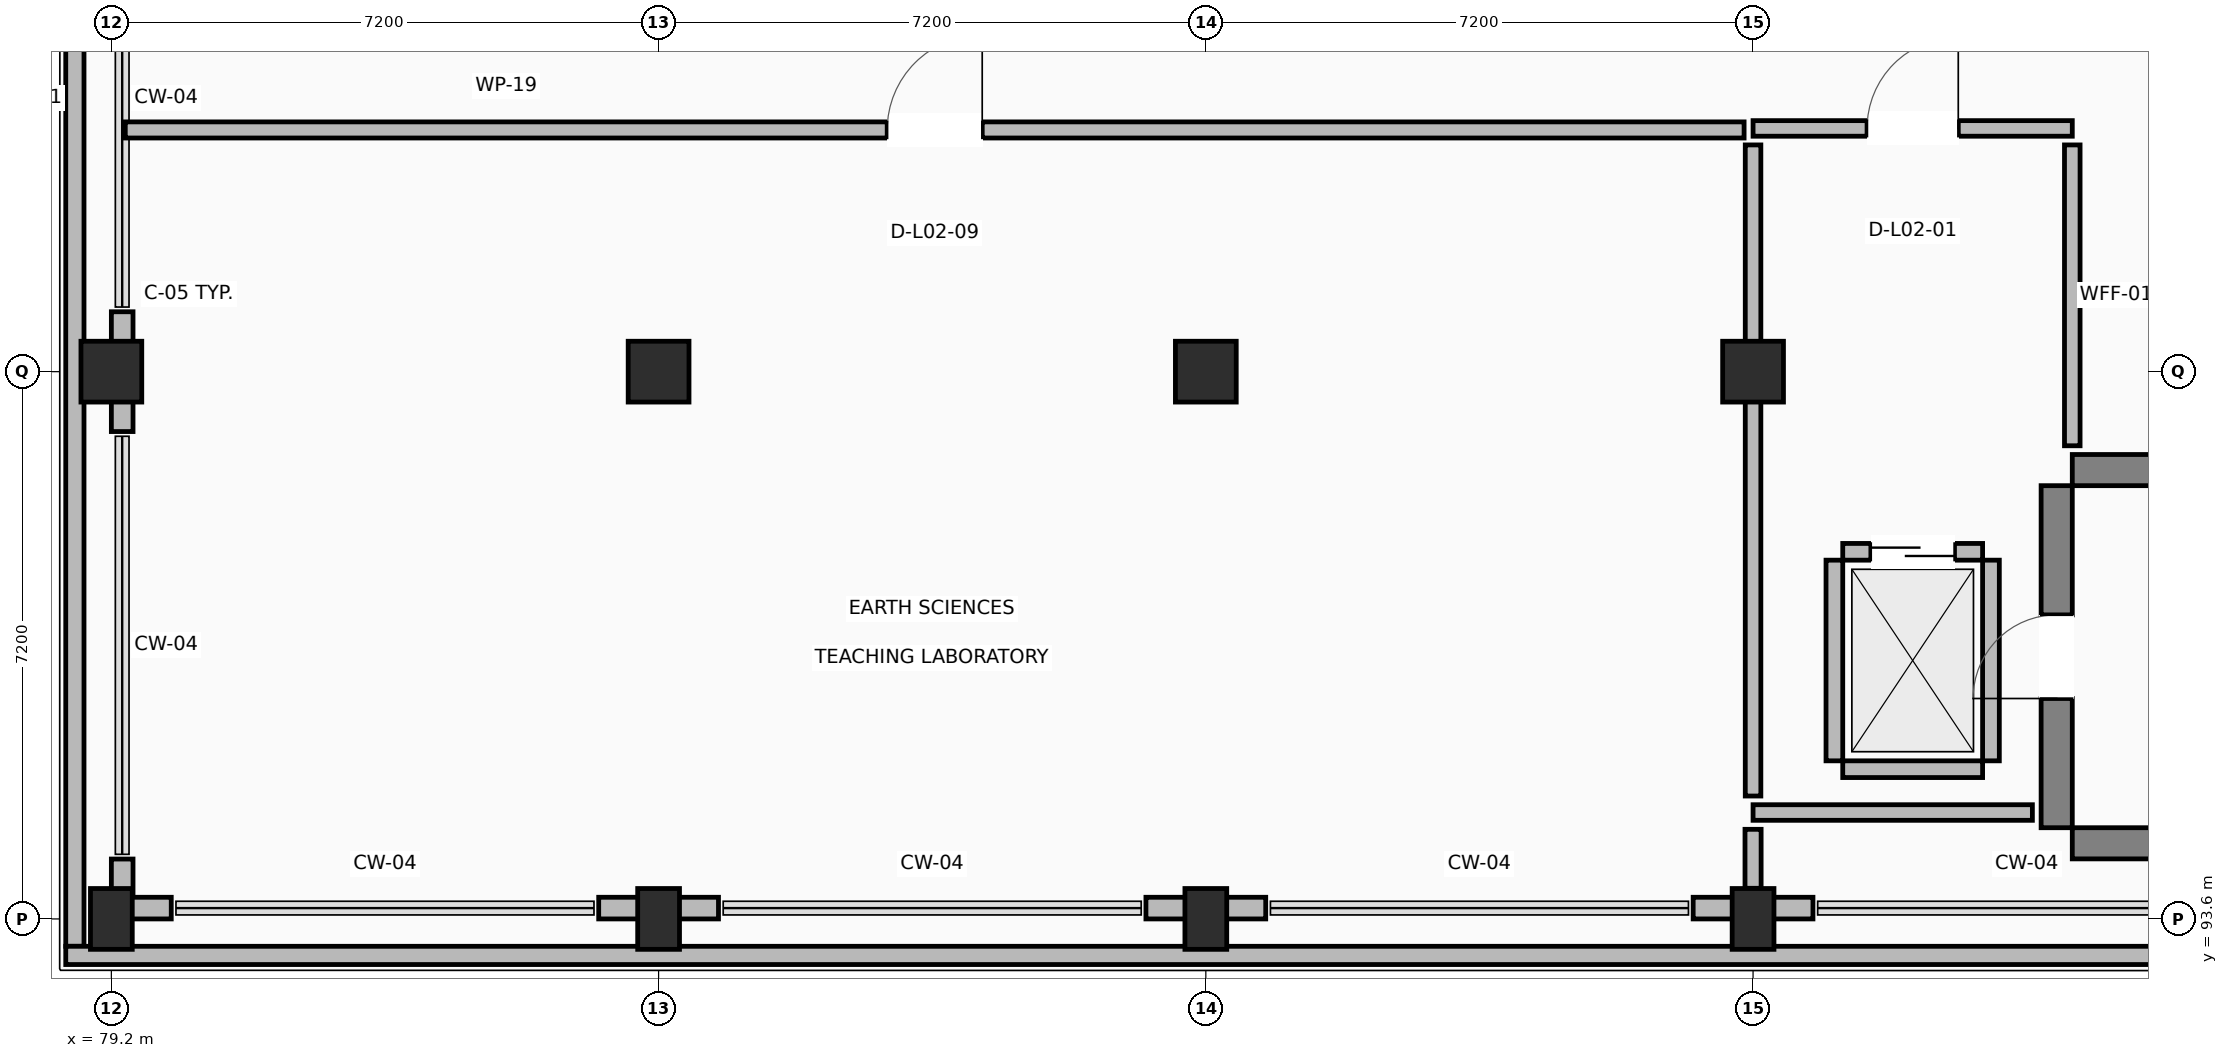
"""IFC4 building model, lengths in metres.
Left out: names, types, materials, properties, quantities, classifications, styles, units other than length and angle.
Written with IfcOpenShell. Run it as: python <this file> out.ifc"""

import sys

from ifc_helpers import new_model, si_unit, direction, frame, frame_2d, origin, origin_2d, place, context, subcontext, project, spatial, rectangle, extrude, element, fill, save


model = new_model("IFC4")
c1 = context("Model", 3, precision=1e-05, world=origin(), true_north=direction((0.0, 1.0)))
c2 = subcontext(c1, "Body", "Model", "MODEL_VIEW")
j1 = project(units=[si_unit("LENGTHUNIT", "METRE"), si_unit("PLANEANGLEUNIT", "RADIAN")], contexts=[c1])
p1 = place(None, origin())
s1 = spatial("IfcSite", under=j1, at=p1, CompositionType="ELEMENT")
p2 = place(p1, origin())
s2 = spatial("IfcBuilding", under=s1, at=p2, CompositionType="ELEMENT")
p3 = place(p2, frame((0.0, 0.0, 9.0)))
s3 = spatial("IfcBuildingStorey", under=s2, at=p3, CompositionType="ELEMENT", Elevation=9.0)
p4 = place(p3, frame((79.2, 93.6, 0.0), z_axis=(0.0, 0.0, 1.0), x_axis=(1.0, 0.0, 0.0)))
e1 = element("IfcColumn", 1, at=p4, inside=s3, PredefinedType="COLUMN", context=c2, shape_type="SweptSolid", body=[
    extrude(rectangle(XDim=0.55, YDim=0.8, at=origin_2d()), origin(), (0.0, 0.0, 1.0), 4.22),
])
p5 = place(p3, frame((79.2, 100.8, 0.0), z_axis=(0.0, 0.0, 1.0), x_axis=(1.0, 0.0, 0.0)))
e2 = element("IfcColumn", 2, at=p5, inside=s3, PredefinedType="COLUMN", context=c2, shape_type="SweptSolid", body=[
    extrude(rectangle(XDim=0.8, YDim=0.8, at=origin_2d()), origin(), (0.0, 0.0, 1.0), 4.22),
])
p6 = place(p3, frame((86.4, 93.6, 0.0), z_axis=(0.0, 0.0, 1.0), x_axis=(1.0, 0.0, 0.0)))
e3 = element("IfcColumn", 3, at=p6, inside=s3, PredefinedType="COLUMN", context=c2, shape_type="SweptSolid", body=[
    extrude(rectangle(XDim=0.55, YDim=0.8, at=origin_2d()), origin(), (0.0, 0.0, 1.0), 4.22),
])
p7 = place(p3, frame((86.4, 100.8, 0.0), z_axis=(0.0, 0.0, 1.0), x_axis=(1.0, 0.0, 0.0)))
e4 = element("IfcColumn", 4, at=p7, inside=s3, PredefinedType="COLUMN", context=c2, shape_type="SweptSolid", body=[
    extrude(rectangle(XDim=0.8, YDim=0.8, at=origin_2d()), origin(), (0.0, 0.0, 1.0), 4.22),
])
p8 = place(p3, frame((93.6, 93.6, 0.0), z_axis=(0.0, 0.0, 1.0), x_axis=(1.0, 0.0, 0.0)))
e5 = element("IfcColumn", 5, at=p8, inside=s3, PredefinedType="COLUMN", context=c2, shape_type="SweptSolid", body=[
    extrude(rectangle(XDim=0.55, YDim=0.8, at=origin_2d()), origin(), (0.0, 0.0, 1.0), 4.22),
])
p9 = place(p3, frame((93.6, 100.8, 0.0), z_axis=(0.0, 0.0, 1.0), x_axis=(1.0, 0.0, 0.0)))
e6 = element("IfcColumn", 6, at=p9, inside=s3, PredefinedType="COLUMN", context=c2, shape_type="SweptSolid", body=[
    extrude(rectangle(XDim=0.8, YDim=0.8, at=origin_2d()), origin(), (0.0, 0.0, 1.0), 4.22),
])
p10 = place(p3, frame((100.8, 93.6, 0.0), z_axis=(0.0, 0.0, 1.0), x_axis=(1.0, 0.0, 0.0)))
e7 = element("IfcColumn", 7, at=p10, inside=s3, PredefinedType="COLUMN", context=c2, shape_type="SweptSolid", body=[
    extrude(rectangle(XDim=0.55, YDim=0.8, at=origin_2d()), origin(), (0.0, 0.0, 1.0), 4.22),
])
p11 = place(p3, frame((100.8, 100.8, 0.0), z_axis=(0.0, 0.0, 1.0), x_axis=(1.0, 0.0, 0.0)))
e8 = element("IfcColumn", 8, at=p11, inside=s3, PredefinedType="COLUMN", context=c2, shape_type="SweptSolid", body=[
    extrude(rectangle(XDim=0.8, YDim=0.8, at=origin_2d()), origin(), (0.0, 0.0, 1.0), 4.22),
])
for number, where, z_axis, x_axis in (
    (9, (105.0, 94.595, 0.0), (0.0, 0.0, 1.0), (1.0, 0.0, 0.0)),
    (10, (105.0, 99.505, 0.0), (0.0, 0.0, 1.0), (1.0, 0.0, 0.0)),
):
    element("IfcWall", number, at=place(p3, frame(where, z_axis=z_axis, x_axis=x_axis)), inside=s3, PredefinedType="SHEAR", context=c2, shape_type="SweptSolid", body=[
        extrude(rectangle(XDim=9.5, YDim=0.41, at=frame_2d((4.75, 0.0))), origin(), (0.0, 0.0, 1.0), 4.22),
    ])
p12 = place(p3, frame((104.795, 94.8, 0.0), z_axis=(0.0, 0.0, 1.0), x_axis=(0.0, 1.0, 0.0)))
e11 = element("IfcWall", 11, at=p12, inside=s3, PredefinedType="SHEAR", context=c2, shape_type="SweptSolid", body=[
    extrude(rectangle(XDim=4.5, YDim=0.41, at=frame_2d((2.25, 0.0))), origin(), (0.0, 0.0, 1.0), 4.22),
])
p13 = place(p12, frame((1.7, 0.0, 0.0)))
e12 = element("IfcOpeningElement", 12, at=p13, cuts=e11, PredefinedType="OPENING", context=c2, shape_type="SweptSolid", body=[
    extrude(rectangle(XDim=1.1, YDim=2.15, at=frame_2d((0.55, 1.075))), frame((0.0, 0.215, 0.0), z_axis=(0.0, -1.0, 0.0), x_axis=(1.0, 0.0, 0.0)), (0.0, 0.0, 1.0), 0.43),
])
p14 = place(p3, frame((79.343, 101.588, 0.0), z_axis=(0.0, 0.0, 1.0), x_axis=(0.0, -1.0, 0.0)))
e13 = element("IfcWall", 13, at=p14, inside=s3, PredefinedType="STANDARD", context=c2, shape_type="SweptSolid", body=[
    extrude(rectangle(XDim=1.576, YDim=0.285, at=frame_2d((0.788, 0.0))), origin(), (0.0, 0.0, 1.0), 3.26),
])
p15 = place(p3, frame((79.343, 94.388, 0.0), z_axis=(0.0, 0.0, 1.0), x_axis=(0.0, -1.0, 0.0)))
e14 = element("IfcWall", 14, at=p15, inside=s3, PredefinedType="STANDARD", context=c2, shape_type="SweptSolid", body=[
    extrude(rectangle(XDim=0.503, YDim=0.285, at=frame_2d((0.251, 0.0))), origin(), (0.0, 0.0, 1.0), 3.26),
])
p16 = place(p3, frame((79.2, 93.742, 0.0), z_axis=(0.0, 0.0, 1.0), x_axis=(1.0, 0.0, 0.0)))
e15 = element("IfcWall", 15, at=p16, inside=s3, PredefinedType="STANDARD", context=c2, shape_type="SweptSolid", body=[
    extrude(rectangle(XDim=0.788, YDim=0.285, at=frame_2d((0.394, 0.0))), origin(), (0.0, 0.0, 1.0), 3.26),
])
for number, where, z_axis, x_axis in (
    (16, (85.612, 93.742, 0.0), (0.0, 0.0, 1.0), (1.0, 0.0, 0.0)),
    (17, (92.812, 93.742, 0.0), (0.0, 0.0, 1.0), (1.0, 0.0, 0.0)),
    (18, (100.012, 93.742, 0.0), (0.0, 0.0, 1.0), (1.0, 0.0, 0.0)),
):
    element("IfcWall", number, at=place(p3, frame(where, z_axis=z_axis, x_axis=x_axis)), inside=s3, PredefinedType="STANDARD", context=c2, shape_type="SweptSolid", body=[
        extrude(rectangle(XDim=1.576, YDim=0.285, at=frame_2d((0.788, 0.0))), origin(), (0.0, 0.0, 1.0), 3.26),
    ])
p17 = place(p3, frame((78.72, 93.24, 0.0), z_axis=(0.0, 0.0, 1.0), x_axis=(0.0, 1.0, 0.0)))
e19 = element("IfcWall", 19, at=p17, inside=s3, PredefinedType="PARAPET", context=c2, shape_type="SweptSolid", body=[
    extrude(rectangle(XDim=22.32, YDim=0.24, at=frame_2d((11.16, 0.0))), origin(), (0.0, 0.0, 1.0), 1.12),
])
p18 = place(p3, frame((136.44, 93.12, 0.0), z_axis=(0.0, 0.0, 1.0), x_axis=(-1.0, 0.0, 0.0)))
e20 = element("IfcWall", 20, at=p18, inside=s3, PredefinedType="PARAPET", context=c2, shape_type="SweptSolid", body=[
    extrude(rectangle(XDim=57.84, YDim=0.24, at=frame_2d((28.92, 0.0))), origin(), (0.0, 0.0, 1.0), 1.12),
])
p19 = place(p3, frame((101.98, 95.57, 0.0), z_axis=(0.0, 0.0, 1.0), x_axis=(1.0, 0.0, 0.0)))
e21 = element("IfcWall", 21, at=p19, inside=s3, PredefinedType="STANDARD", context=c2, shape_type="SweptSolid", body=[
    extrude(rectangle(XDim=1.84, YDim=0.22, at=frame_2d((0.92, 0.0))), origin(), (0.0, 0.0, 1.0), 3.26),
])
p20 = place(p3, frame((101.98, 98.43, 0.0), z_axis=(0.0, 0.0, 1.0), x_axis=(1.0, 0.0, 0.0)))
e22 = element("IfcWall", 22, at=p20, inside=s3, PredefinedType="STANDARD", context=c2, shape_type="SweptSolid", body=[
    extrude(rectangle(XDim=1.84, YDim=0.22, at=frame_2d((0.92, 0.0))), origin(), (0.0, 0.0, 1.0), 3.26),
])
p21 = place(p20, frame((0.37, 0.0, 0.0)))
e23 = element("IfcOpeningElement", 23, at=p21, cuts=e22, PredefinedType="OPENING", context=c2, shape_type="SweptSolid", body=[
    extrude(rectangle(XDim=1.1, YDim=2.15, at=frame_2d((0.55, 1.075))), frame((0.0, 0.12, 0.0), z_axis=(0.0, -1.0, 0.0), x_axis=(1.0, 0.0, 0.0)), (0.0, 0.0, 1.0), 0.24),
])
for number, where, z_axis, x_axis in (
    (24, (101.87, 95.68, 0.0), (0.0, 0.0, 1.0), (0.0, 1.0, 0.0)),
    (25, (103.93, 95.68, 0.0), (0.0, 0.0, 1.0), (0.0, 1.0, 0.0)),
):
    element("IfcWall", number, at=place(p3, frame(where, z_axis=z_axis, x_axis=x_axis)), inside=s3, PredefinedType="STANDARD", context=c2, shape_type="SweptSolid", body=[
        extrude(rectangle(XDim=2.64, YDim=0.22, at=frame_2d((1.32, 0.0))), origin(), (0.0, 0.0, 1.0), 3.26),
    ])
p22 = place(p3, frame((100.8, 104.0, 0.0), z_axis=(0.0, 0.0, 1.0), x_axis=(1.0, 0.0, 0.0)))
e26 = element("IfcWall", 26, at=p22, inside=s3, PredefinedType="PARTITIONING", context=c2, shape_type="SweptSolid", body=[
    extrude(rectangle(XDim=4.2, YDim=0.205, at=frame_2d((2.1, 0.0))), origin(), (0.0, 0.0, 1.0), 3.26),
])
p23 = place(p22, frame((1.5, 0.0, 0.0)))
e27 = element("IfcOpeningElement", 27, at=p23, cuts=e26, PredefinedType="OPENING", context=c2, shape_type="SweptSolid", body=[
    extrude(rectangle(XDim=1.2, YDim=2.15, at=frame_2d((0.6, 1.075))), frame((0.0, 0.113, 0.0), z_axis=(0.0, -1.0, 0.0), x_axis=(1.0, 0.0, 0.0)), (0.0, 0.0, 1.0), 0.225),
])
p24 = place(p3, frame((105.0, 103.783, 0.0), z_axis=(0.0, 0.0, 1.0), x_axis=(0.0, -1.0, 0.0)))
e28 = element("IfcWall", 28, at=p24, inside=s3, PredefinedType="PARTITIONING", context=c2, shape_type="SweptSolid", body=[
    extrude(rectangle(XDim=3.958, YDim=0.205, at=frame_2d((1.979, 0.0))), origin(), (0.0, 0.0, 1.0), 3.26),
])
p25 = place(p3, frame((104.475, 95.0, 0.0), z_axis=(0.0, 0.0, 1.0), x_axis=(-1.0, 0.0, 0.0)))
e29 = element("IfcWall", 29, at=p25, inside=s3, PredefinedType="PARTITIONING", context=c2, shape_type="SweptSolid", body=[
    extrude(rectangle(XDim=3.675, YDim=0.205, at=frame_2d((1.837, 0.0))), origin(), (0.0, 0.0, 1.0), 3.26),
])
p26 = place(p3, frame((100.8, 95.217, 0.0), z_axis=(0.0, 0.0, 1.0), x_axis=(0.0, 1.0, 0.0)))
e30 = element("IfcWall", 30, at=p26, inside=s3, PredefinedType="PARTITIONING", context=c2, shape_type="SweptSolid", body=[
    extrude(rectangle(XDim=8.566, YDim=0.205, at=frame_2d((4.283, 0.0))), origin(), (0.0, 0.0, 1.0), 3.26),
])
p27 = place(p3, frame((79.383, 103.98, 0.0), z_axis=(0.0, 0.0, 1.0), x_axis=(1.0, 0.0, 0.0)))
e31 = element("IfcWall", 31, at=p27, inside=s3, PredefinedType="PARTITIONING", context=c2, shape_type="SweptSolid", body=[
    extrude(rectangle(XDim=21.299, YDim=0.212, at=frame_2d((10.649, 0.0))), origin(), (0.0, 0.0, 1.0), 3.26),
])
p28 = place(p27, frame((10.025, 0.0, 0.0)))
e32 = element("IfcOpeningElement", 32, at=p28, cuts=e31, PredefinedType="OPENING", context=c2, shape_type="SweptSolid", body=[
    extrude(rectangle(XDim=1.25, YDim=2.15, at=frame_2d((0.625, 1.075))), frame((0.0, 0.116, 0.0), z_axis=(0.0, -1.0, 0.0), x_axis=(1.0, 0.0, 0.0)), (0.0, 0.0, 1.0), 0.232),
])
p29 = place(p3, frame((100.8, 94.779, 0.0), z_axis=(0.0, 0.0, 1.0), x_axis=(0.0, -1.0, 0.0)))
e33 = element("IfcWall", 33, at=p29, inside=s3, PredefinedType="PARTITIONING", context=c2, shape_type="SweptSolid", body=[
    extrude(rectangle(XDim=0.776, YDim=0.212, at=frame_2d((0.388, 0.0))), origin(), (0.0, 0.0, 1.0), 3.26),
])
p30 = place(p13, origin())
e34 = element("IfcDoor", 34, at=p30, inside=s3, OperationType="SINGLE_SWING_LEFT", PredefinedType="DOOR", context=c2, shape_type="SweptSolid", body=[
    extrude(rectangle(XDim=1.1, YDim=2.15, at=frame_2d((0.55, 1.075))), frame((0.0, 0.025, 0.0), z_axis=(0.0, -1.0, 0.0), x_axis=(1.0, 0.0, 0.0)), (0.0, 0.0, 1.0), 0.05),
])
fill(e12, e34)
p31 = place(p21, origin())
e35 = element("IfcDoor", 35, at=p31, inside=s3, OperationType="SLIDING_TO_LEFT", PredefinedType="DOOR", context=c2, shape_type="SweptSolid", body=[
    extrude(rectangle(XDim=1.1, YDim=2.15, at=frame_2d((0.55, 1.075))), frame((0.0, 0.025, 0.0), z_axis=(0.0, -1.0, 0.0), x_axis=(1.0, 0.0, 0.0)), (0.0, 0.0, 1.0), 0.05),
])
fill(e23, e35)
p32 = place(p23, origin())
e36 = element("IfcDoor", 36, at=p32, inside=s3, OperationType="SINGLE_SWING_RIGHT", PredefinedType="DOOR", context=c2, shape_type="SweptSolid", body=[
    extrude(rectangle(XDim=1.2, YDim=2.15, at=frame_2d((0.6, 1.075))), frame((0.0, 0.025, 0.0), z_axis=(0.0, -1.0, 0.0), x_axis=(1.0, 0.0, 0.0)), (0.0, 0.0, 1.0), 0.05),
])
fill(e27, e36)
p33 = place(p28, origin())
e37 = element("IfcDoor", 37, at=p33, inside=s3, OperationType="SINGLE_SWING_RIGHT", PredefinedType="DOOR", context=c2, shape_type="SweptSolid", body=[
    extrude(rectangle(XDim=1.25, YDim=2.15, at=frame_2d((0.625, 1.075))), frame((0.0, 0.025, 0.0), z_axis=(0.0, -1.0, 0.0), x_axis=(1.0, 0.0, 0.0)), (0.0, 0.0, 1.0), 0.05),
])
fill(e32, e37)
save(model, sys.argv[1])
